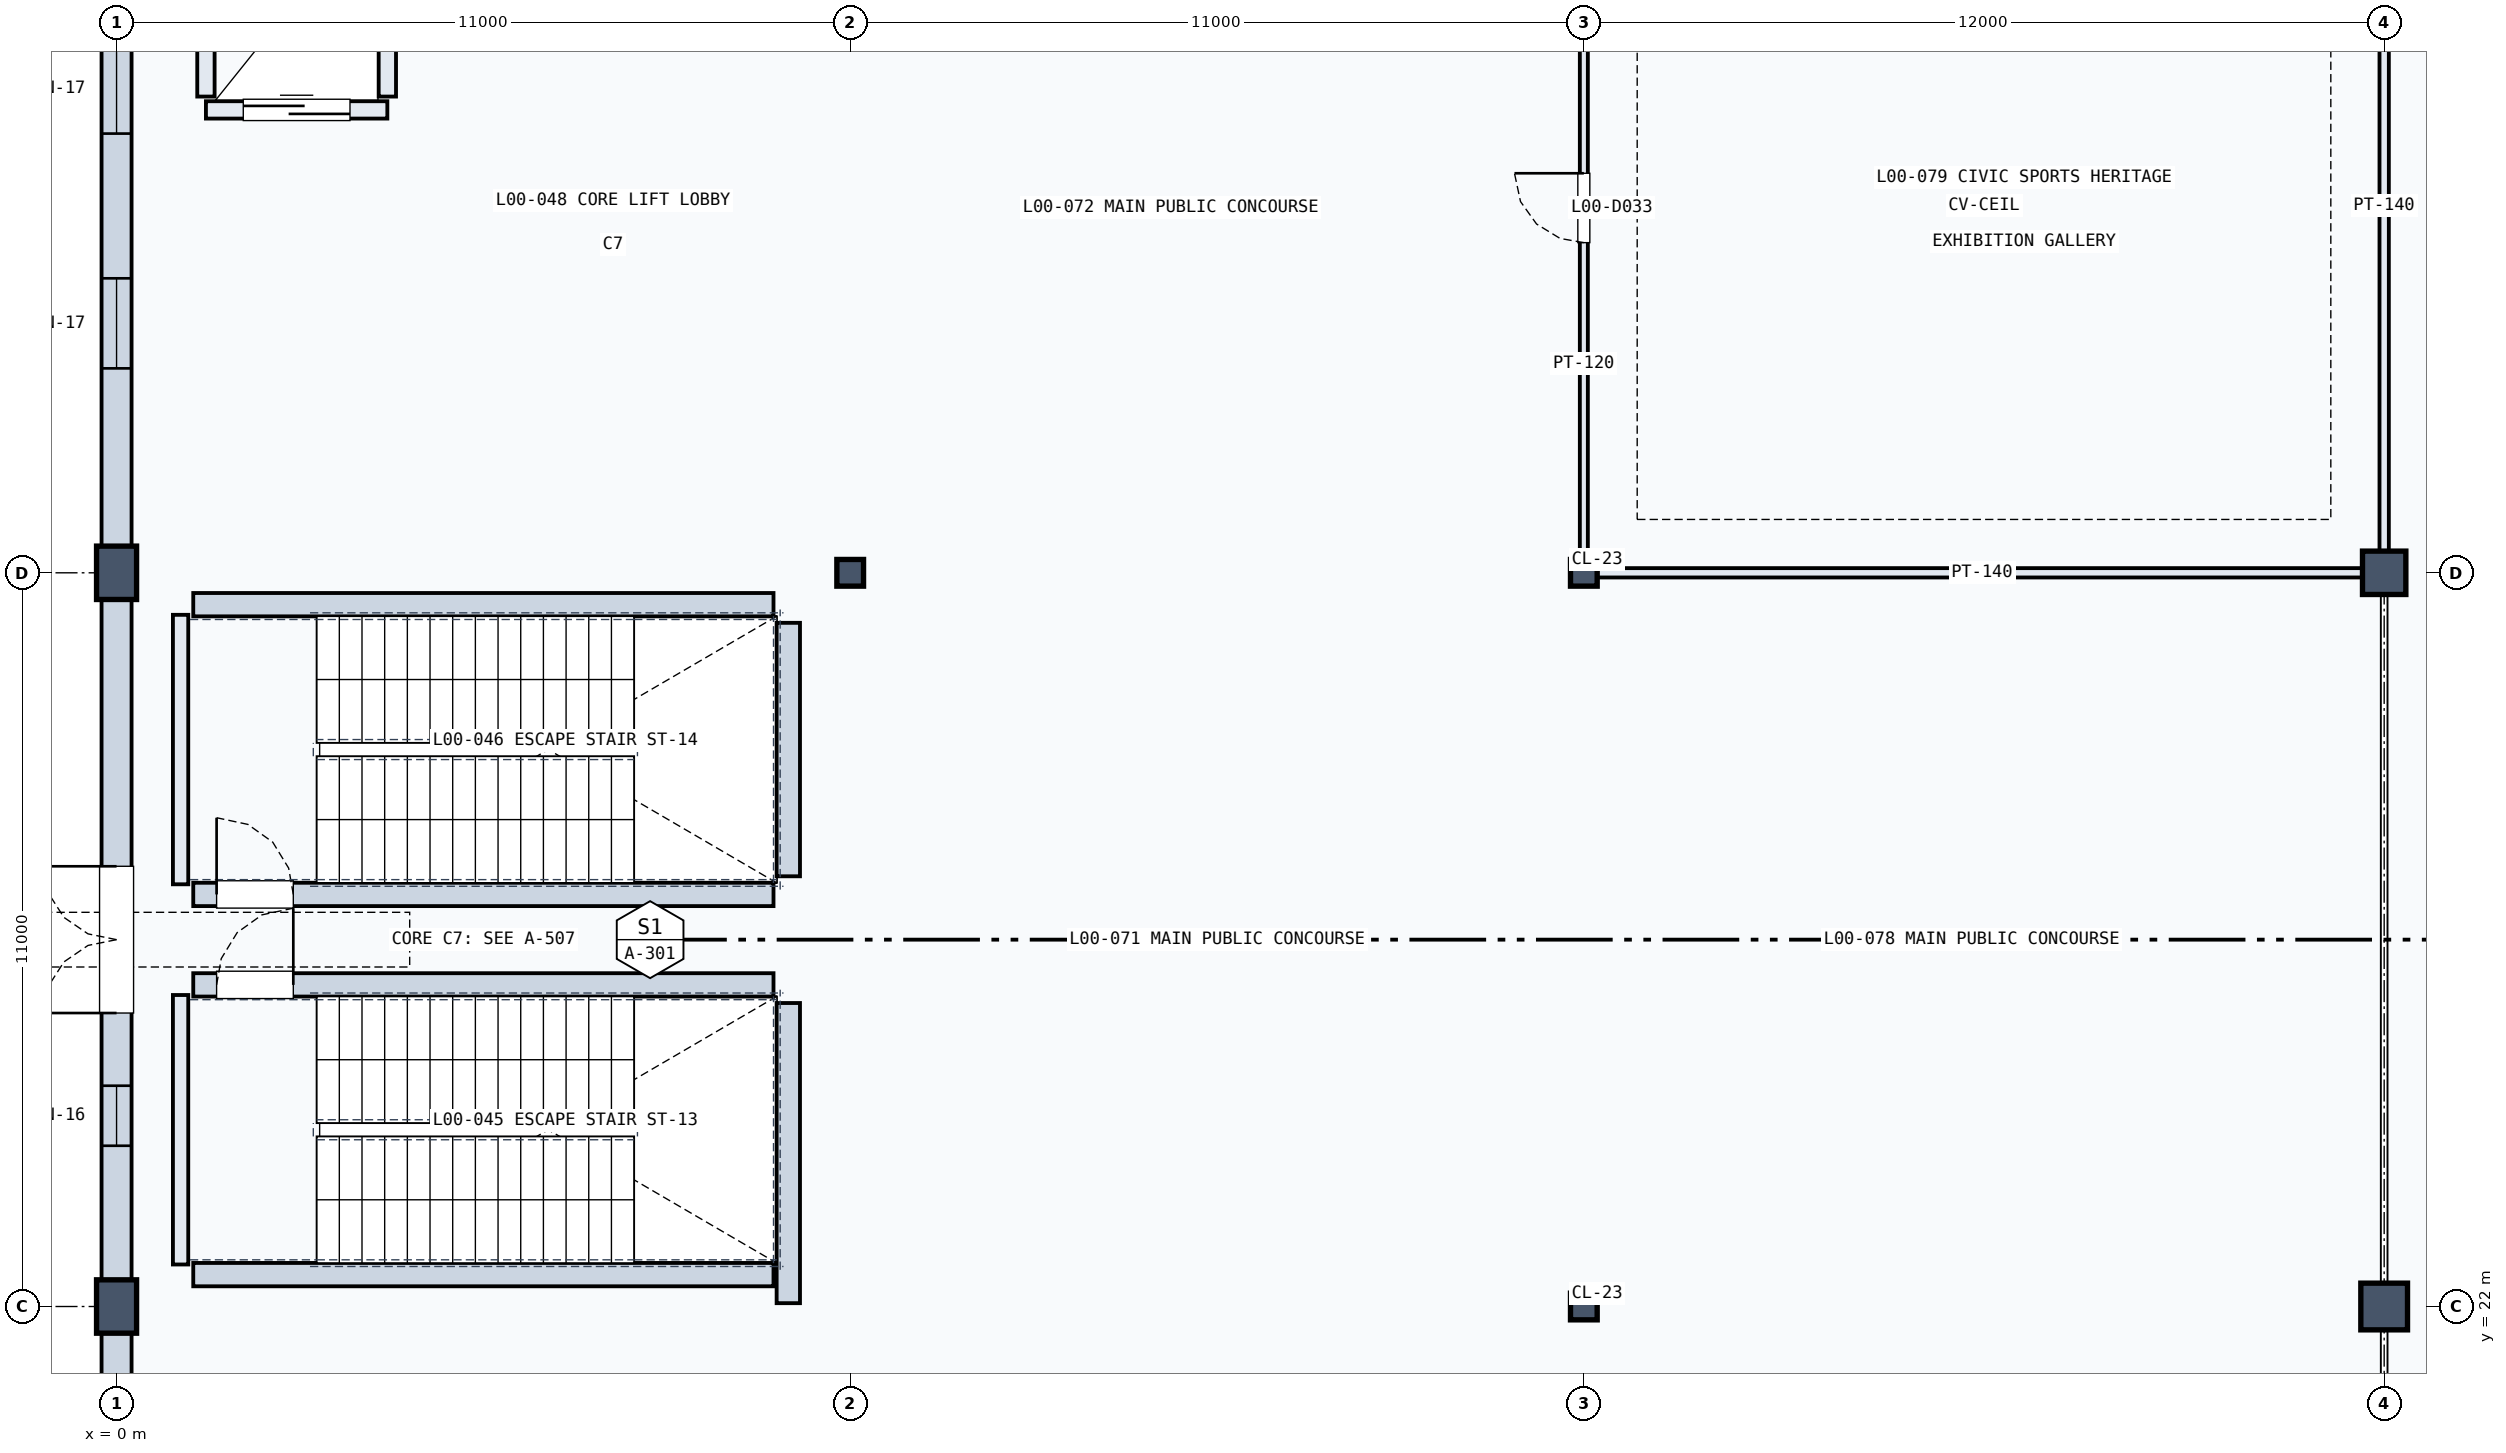
"""IFC4 building model, lengths in metres.
Left out: names, types, materials, properties, quantities, classifications, styles, units other than length and angle.
Written with IfcOpenShell. Run it as: python <this file> out.ifc"""

import sys

from ifc_helpers import new_model, si_unit, direction, frame, frame_2d, origin, origin_2d, place, context, subcontext, project, spatial, rectangle, hollow_rectangle, extrude, element, fill, save


model = new_model("IFC4")
c1 = context("Model", 3, precision=1e-05, world=origin(), true_north=direction((0.0, 1.0)))
c2 = subcontext(c1, "Body", "Model", "MODEL_VIEW")
j1 = project(units=[si_unit("LENGTHUNIT", "METRE"), si_unit("PLANEANGLEUNIT", "RADIAN")], contexts=[c1])
p1 = place(None, origin())
s1 = spatial("IfcSite", under=j1, at=p1, CompositionType="ELEMENT")
p2 = place(p1, origin())
s2 = spatial("IfcBuilding", under=s1, at=p2, CompositionType="ELEMENT")
p3 = place(p2, origin())
s3 = spatial("IfcBuildingStorey", under=s2, at=p3, CompositionType="ELEMENT", Elevation=0.0)
for number, where, z_axis, x_axis in (
    (1, (0.0, 22.0, 0.0), (0.0, 0.0, 1.0), (1.0, 0.0, 0.0)),
    (2, (0.0, 33.0, 0.0), (0.0, 0.0, 1.0), (1.0, 0.0, 0.0)),
):
    element("IfcColumn", number, at=place(p3, frame(where, z_axis=z_axis, x_axis=x_axis)), inside=s3, PredefinedType="COLUMN", context=c2, shape_type="SweptSolid", body=[
        extrude(rectangle(XDim=0.6, YDim=0.8, at=origin_2d()), origin(), (0.0, 0.0, 1.0), 5.4),
    ])
for number, where, z_axis, x_axis in (
    (3, (11.0, 33.0, 0.0), (0.0, 0.0, 1.0), (1.0, 0.0, 0.0)),
    (4, (22.0, 22.0, 0.0), (0.0, 0.0, 1.0), (1.0, 0.0, 0.0)),
    (5, (22.0, 33.0, 0.0), (0.0, 0.0, 1.0), (1.0, 0.0, 0.0)),
):
    element("IfcColumn", number, at=place(p3, frame(where, z_axis=z_axis, x_axis=x_axis)), inside=s3, PredefinedType="COLUMN", context=c2, shape_type="SweptSolid", body=[
        extrude(hollow_rectangle(XDim=0.4, YDim=0.4, WallThickness=0.02, at=origin_2d()), origin(), (0.0, 0.0, 1.0), 5.4),
    ])
p4 = place(p3, frame((34.0, 22.0, 0.0), z_axis=(0.0, 0.0, 1.0), x_axis=(1.0, 0.0, 0.0)))
e6 = element("IfcColumn", 6, at=p4, inside=s3, PredefinedType="COLUMN", context=c2, shape_type="SweptSolid", body=[
    extrude(rectangle(XDim=0.7, YDim=0.7, at=origin_2d()), origin(), (0.0, 0.0, 1.0), 5.4),
])
p5 = place(p3, frame((34.0, 33.0, 0.0), z_axis=(0.0, 0.0, 1.0), x_axis=(1.0, 0.0, 0.0)))
e7 = element("IfcColumn", 7, at=p5, inside=s3, PredefinedType="COLUMN", context=c2, shape_type="SweptSolid", body=[
    extrude(rectangle(XDim=0.65, YDim=0.65, at=origin_2d()), origin(), (0.0, 0.0, 1.0), 5.4),
])
p6 = place(p3, frame((0.0, 11.22, 0.0), z_axis=(0.0, 0.0, 1.0), x_axis=(0.0, 1.0, 0.0)))
e8 = element("IfcWall", 8, at=p6, inside=s3, PredefinedType="SOLIDWALL", context=c2, shape_type="SweptSolid", body=[
    extrude(rectangle(XDim=10.56, YDim=0.45, at=frame_2d((5.28, 0.0))), origin(), (0.0, 0.0, 1.0), 4.3),
])
p7 = place(p6, frame((2.845, 0.0, 0.8)))
e9 = element("IfcOpeningElement", 9, at=p7, cuts=e8, PredefinedType="OPENING", context=c2, shape_type="SweptSolid", body=[
    extrude(rectangle(XDim=1.35, YDim=2.1, at=frame_2d((0.675, 1.05))), frame((0.0, 0.235, 0.0), z_axis=(0.0, -1.0, 0.0), x_axis=(1.0, 0.0, 0.0)), (0.0, 0.0, 1.0), 0.47),
])
p8 = place(p6, frame((6.365, 0.0, 0.8)))
e10 = element("IfcOpeningElement", 10, at=p8, cuts=e8, PredefinedType="OPENING", context=c2, shape_type="SweptSolid", body=[
    extrude(rectangle(XDim=1.35, YDim=2.1, at=frame_2d((0.675, 1.05))), frame((0.0, 0.235, 0.0), z_axis=(0.0, -1.0, 0.0), x_axis=(1.0, 0.0, 0.0)), (0.0, 0.0, 1.0), 0.47),
])
p9 = place(p3, frame((0.0, 22.22, 0.0), z_axis=(0.0, 0.0, 1.0), x_axis=(0.0, 1.0, 0.0)))
e11 = element("IfcWall", 11, at=p9, inside=s3, PredefinedType="SOLIDWALL", context=c2, shape_type="SweptSolid", body=[
    extrude(rectangle(XDim=10.56, YDim=0.45, at=frame_2d((5.28, 0.0))), origin(), (0.0, 0.0, 1.0), 4.43),
])
p10 = place(p9, frame((4.18, 0.0, 0.0)))
e12 = element("IfcOpeningElement", 12, at=p10, cuts=e11, PredefinedType="OPENING", context=c2, shape_type="SweptSolid", body=[
    extrude(rectangle(XDim=2.2, YDim=2.35, at=frame_2d((1.1, 1.175))), frame((0.0, 0.235, 0.0), z_axis=(0.0, -1.0, 0.0), x_axis=(1.0, 0.0, 0.0)), (0.0, 0.0, 1.0), 0.47),
])
p11 = place(p9, frame((2.19, 0.0, 0.8)))
e13 = element("IfcOpeningElement", 13, at=p11, cuts=e11, PredefinedType="OPENING", context=c2, shape_type="SweptSolid", body=[
    extrude(rectangle(XDim=0.9, YDim=1.8, at=frame_2d((0.45, 0.9))), frame((0.0, 0.235, 0.0), z_axis=(0.0, -1.0, 0.0), x_axis=(1.0, 0.0, 0.0)), (0.0, 0.0, 1.0), 0.47),
])
p12 = place(p3, frame((0.0, 33.22, 0.0), z_axis=(0.0, 0.0, 1.0), x_axis=(0.0, 1.0, 0.0)))
e14 = element("IfcWall", 14, at=p12, inside=s3, PredefinedType="SOLIDWALL", context=c2, shape_type="SweptSolid", body=[
    extrude(rectangle(XDim=10.56, YDim=0.45, at=frame_2d((5.28, 0.0))), origin(), (0.0, 0.0, 1.0), 4.43),
])
p13 = place(p12, frame((2.845, 0.0, 0.8)))
e15 = element("IfcOpeningElement", 15, at=p13, cuts=e14, PredefinedType="OPENING", context=c2, shape_type="SweptSolid", body=[
    extrude(rectangle(XDim=1.35, YDim=2.1, at=frame_2d((0.675, 1.05))), frame((0.0, 0.235, 0.0), z_axis=(0.0, -1.0, 0.0), x_axis=(1.0, 0.0, 0.0)), (0.0, 0.0, 1.0), 0.47),
])
p14 = place(p12, frame((6.365, 0.0, 0.8)))
e16 = element("IfcOpeningElement", 16, at=p14, cuts=e14, PredefinedType="OPENING", context=c2, shape_type="SweptSolid", body=[
    extrude(rectangle(XDim=1.35, YDim=2.1, at=frame_2d((0.675, 1.05))), frame((0.0, 0.235, 0.0), z_axis=(0.0, -1.0, 0.0), x_axis=(1.0, 0.0, 0.0)), (0.0, 0.0, 1.0), 0.47),
])
p15 = place(p3, frame((0.96, 22.63, 0.0), z_axis=(0.0, 0.0, 1.0), x_axis=(0.0, 1.0, 0.0)))
e17 = element("IfcWall", 17, at=p15, inside=s3, PredefinedType="SOLIDWALL", context=c2, shape_type="SweptSolid", body=[
    extrude(rectangle(XDim=4.04, YDim=0.23, at=frame_2d((2.02, 0.0))), origin(), (0.0, 0.0, 1.0), 5.06),
])
p16 = place(p3, frame((10.072, 22.05, 0.0), z_axis=(0.0, 0.0, 1.0), x_axis=(0.0, 1.0, 0.0)))
e18 = element("IfcWall", 18, at=p16, inside=s3, PredefinedType="SOLIDWALL", context=c2, shape_type="SweptSolid", body=[
    extrude(rectangle(XDim=4.5, YDim=0.35, at=frame_2d((2.25, 0.0))), origin(), (0.0, 0.0, 1.0), 5.06),
])
p17 = place(p3, frame((1.15, 22.478, 0.0), z_axis=(0.0, 0.0, 1.0), x_axis=(1.0, 0.0, 0.0)))
e19 = element("IfcWall", 19, at=p17, inside=s3, PredefinedType="SOLIDWALL", context=c2, shape_type="SweptSolid", body=[
    extrude(rectangle(XDim=8.7, YDim=0.35, at=frame_2d((4.35, 0.0))), origin(), (0.0, 0.0, 1.0), 5.06),
])
p18 = place(p3, frame((1.15, 26.822, 0.0), z_axis=(0.0, 0.0, 1.0), x_axis=(1.0, 0.0, 0.0)))
e20 = element("IfcWall", 20, at=p18, inside=s3, PredefinedType="SOLIDWALL", context=c2, shape_type="SweptSolid", body=[
    extrude(rectangle(XDim=8.7, YDim=0.35, at=frame_2d((4.35, 0.0))), origin(), (0.0, 0.0, 1.0), 5.06),
])
p19 = place(p18, frame((0.35, 0.0, 0.0)))
e21 = element("IfcOpeningElement", 21, at=p19, cuts=e20, PredefinedType="OPENING", context=c2, shape_type="SweptSolid", body=[
    extrude(rectangle(XDim=1.15, YDim=2.2, at=frame_2d((0.575, 1.1))), frame((0.0, 0.185, 0.0), z_axis=(0.0, -1.0, 0.0), x_axis=(1.0, 0.0, 0.0)), (0.0, 0.0, 1.0), 0.37),
])
p20 = place(p3, frame((0.96, 28.33, 0.0), z_axis=(0.0, 0.0, 1.0), x_axis=(0.0, 1.0, 0.0)))
e22 = element("IfcWall", 22, at=p20, inside=s3, PredefinedType="SOLIDWALL", context=c2, shape_type="SweptSolid", body=[
    extrude(rectangle(XDim=4.04, YDim=0.23, at=frame_2d((2.02, 0.0))), origin(), (0.0, 0.0, 1.0), 5.06),
])
p21 = place(p3, frame((10.072, 28.45, 0.0), z_axis=(0.0, 0.0, 1.0), x_axis=(0.0, 1.0, 0.0)))
e23 = element("IfcWall", 23, at=p21, inside=s3, PredefinedType="SOLIDWALL", context=c2, shape_type="SweptSolid", body=[
    extrude(rectangle(XDim=3.8, YDim=0.35, at=frame_2d((1.9, 0.0))), origin(), (0.0, 0.0, 1.0), 5.06),
])
p22 = place(p3, frame((1.15, 28.178, 0.0), z_axis=(0.0, 0.0, 1.0), x_axis=(1.0, 0.0, 0.0)))
e24 = element("IfcWall", 24, at=p22, inside=s3, PredefinedType="SOLIDWALL", context=c2, shape_type="SweptSolid", body=[
    extrude(rectangle(XDim=8.7, YDim=0.35, at=frame_2d((4.35, 0.0))), origin(), (0.0, 0.0, 1.0), 5.06),
])
p23 = place(p22, frame((0.35, 0.0, 0.0)))
e25 = element("IfcOpeningElement", 25, at=p23, cuts=e24, PredefinedType="OPENING", context=c2, shape_type="SweptSolid", body=[
    extrude(rectangle(XDim=1.15, YDim=2.2, at=frame_2d((0.575, 1.1))), frame((0.0, 0.185, 0.0), z_axis=(0.0, -1.0, 0.0), x_axis=(1.0, 0.0, 0.0)), (0.0, 0.0, 1.0), 0.37),
])
p24 = place(p3, frame((1.15, 32.522, 0.0), z_axis=(0.0, 0.0, 1.0), x_axis=(1.0, 0.0, 0.0)))
e26 = element("IfcWall", 26, at=p24, inside=s3, PredefinedType="SOLIDWALL", context=c2, shape_type="SweptSolid", body=[
    extrude(rectangle(XDim=8.7, YDim=0.35, at=frame_2d((4.35, 0.0))), origin(), (0.0, 0.0, 1.0), 5.06),
])
p25 = place(p3, frame((1.34, 39.94, 0.0), z_axis=(0.0, 0.0, 1.0), x_axis=(1.0, 0.0, 0.0)))
e27 = element("IfcWall", 27, at=p25, inside=s3, PredefinedType="SOLIDWALL", context=c2, shape_type="SweptSolid", body=[
    extrude(rectangle(XDim=2.72, YDim=0.26, at=frame_2d((1.36, 0.0))), origin(), (0.0, 0.0, 1.0), 5.06),
])
p26 = place(p25, frame((0.56, 0.0, 0.0)))
e28 = element("IfcOpeningElement", 28, at=p26, cuts=e27, PredefinedType="OPENING", context=c2, shape_type="SweptSolid", body=[
    extrude(rectangle(XDim=1.6, YDim=2.35, at=frame_2d((0.8, 1.175))), frame((0.0, 0.14, 0.0), z_axis=(0.0, -1.0, 0.0), x_axis=(1.0, 0.0, 0.0)), (0.0, 0.0, 1.0), 0.28),
])
for number, where, z_axis, x_axis in (
    (29, (1.34, 40.14, 0.0), (0.0, 0.0, 1.0), (0.0, 1.0, 0.0)),
    (30, (4.06, 40.14, 0.0), (0.0, 0.0, 1.0), (0.0, 1.0, 0.0)),
):
    element("IfcWall", number, at=place(p3, frame(where, z_axis=z_axis, x_axis=x_axis)), inside=s3, PredefinedType="SOLIDWALL", context=c2, shape_type="SweptSolid", body=[
        extrude(rectangle(XDim=2.92, YDim=0.26, at=frame_2d((1.46, 0.0))), origin(), (0.0, 0.0, 1.0), 5.06),
    ])
p27 = place(p3, frame((22.0, 33.16, 0.0), z_axis=(0.0, 0.0, 1.0), x_axis=(0.0, 1.0, 0.0)))
e31 = element("IfcWall", 31, at=p27, inside=s3, PredefinedType="PARTITIONING", context=c2, shape_type="SweptSolid", body=[
    extrude(rectangle(XDim=10.62, YDim=0.12, at=frame_2d((5.31, 0.0))), origin(), (0.0, 0.0, 1.0), 4.438),
])
p28 = place(p27, frame((4.79, 0.0, 0.0)))
e32 = element("IfcOpeningElement", 32, at=p28, cuts=e31, PredefinedType="OPENING", context=c2, shape_type="SweptSolid", body=[
    extrude(rectangle(XDim=1.04, YDim=2.2, at=frame_2d((0.52, 1.1))), frame((0.0, 0.07, 0.0), z_axis=(0.0, -1.0, 0.0), x_axis=(1.0, 0.0, 0.0)), (0.0, 0.0, 1.0), 0.14),
])
p29 = place(p3, frame((22.16, 33.0, 0.0), z_axis=(0.0, 0.0, 1.0), x_axis=(1.0, 0.0, 0.0)))
e33 = element("IfcWall", 33, at=p29, inside=s3, PredefinedType="PARTITIONING", context=c2, shape_type="SweptSolid", body=[
    extrude(rectangle(XDim=11.62, YDim=0.14, at=frame_2d((5.81, 0.0))), origin(), (0.0, 0.0, 1.0), 4.1),
])
p30 = place(p3, frame((34.0, 33.22, 0.0), z_axis=(0.0, 0.0, 1.0), x_axis=(0.0, 1.0, 0.0)))
e34 = element("IfcWall", 34, at=p30, inside=s3, PredefinedType="PARTITIONING", context=c2, shape_type="SweptSolid", body=[
    extrude(rectangle(XDim=10.56, YDim=0.14, at=frame_2d((5.28, 0.0))), origin(), (0.0, 0.0, 1.0), 4.1),
])
p31 = place(p10, origin())
e35 = element("IfcDoor", 35, at=p31, inside=s3, OperationType="DOUBLE_DOOR_SINGLE_SWING", PredefinedType="DOOR", context=c2, shape_type="SweptSolid", body=[
    extrude(rectangle(XDim=2.2, YDim=2.35, at=frame_2d((1.1, 1.175))), frame((0.0, 0.025, 0.0), z_axis=(0.0, -1.0, 0.0), x_axis=(1.0, 0.0, 0.0)), (0.0, 0.0, 1.0), 0.05),
])
fill(e12, e35)
p32 = place(p11, origin())
e36 = element("IfcWindow", 36, at=p32, inside=s3, PartitioningType="SINGLE_PANEL", PredefinedType="WINDOW", context=c2, shape_type="SweptSolid", body=[
    extrude(rectangle(XDim=0.9, YDim=1.8, at=frame_2d((0.45, 0.9))), frame((0.0, 0.03, 0.0), z_axis=(0.0, -1.0, 0.0), x_axis=(1.0, 0.0, 0.0)), (0.0, 0.0, 1.0), 0.06),
])
fill(e13, e36)
p33 = place(p13, origin())
e37 = element("IfcWindow", 37, at=p33, inside=s3, PartitioningType="SINGLE_PANEL", PredefinedType="WINDOW", context=c2, shape_type="SweptSolid", body=[
    extrude(rectangle(XDim=1.35, YDim=2.1, at=frame_2d((0.675, 1.05))), frame((0.0, 0.03, 0.0), z_axis=(0.0, -1.0, 0.0), x_axis=(1.0, 0.0, 0.0)), (0.0, 0.0, 1.0), 0.06),
])
fill(e15, e37)
p34 = place(p14, origin())
e38 = element("IfcWindow", 38, at=p34, inside=s3, PartitioningType="SINGLE_PANEL", PredefinedType="WINDOW", context=c2, shape_type="SweptSolid", body=[
    extrude(rectangle(XDim=1.35, YDim=2.1, at=frame_2d((0.675, 1.05))), frame((0.0, 0.03, 0.0), z_axis=(0.0, -1.0, 0.0), x_axis=(1.0, 0.0, 0.0)), (0.0, 0.0, 1.0), 0.06),
])
fill(e16, e38)
p35 = place(p19, origin())
e39 = element("IfcDoor", 39, at=p35, inside=s3, OperationType="SINGLE_SWING_RIGHT", PredefinedType="DOOR", context=c2, shape_type="SweptSolid", body=[
    extrude(rectangle(XDim=1.15, YDim=2.2, at=frame_2d((0.575, 1.1))), frame((0.0, 0.025, 0.0), z_axis=(0.0, -1.0, 0.0), x_axis=(1.0, 0.0, 0.0)), (0.0, 0.0, 1.0), 0.05),
])
fill(e21, e39)
p36 = place(p23, origin())
e40 = element("IfcDoor", 40, at=p36, inside=s3, OperationType="SINGLE_SWING_LEFT", PredefinedType="DOOR", context=c2, shape_type="SweptSolid", body=[
    extrude(rectangle(XDim=1.15, YDim=2.2, at=frame_2d((0.575, 1.1))), frame((0.0, 0.025, 0.0), z_axis=(0.0, -1.0, 0.0), x_axis=(1.0, 0.0, 0.0)), (0.0, 0.0, 1.0), 0.05),
])
fill(e25, e40)
p37 = place(p26, origin())
e41 = element("IfcDoor", 41, at=p37, inside=s3, OperationType="DOUBLE_DOOR_SLIDING", PredefinedType="DOOR", context=c2, shape_type="SweptSolid", body=[
    extrude(rectangle(XDim=1.6, YDim=2.35, at=frame_2d((0.8, 1.175))), frame((0.0, 0.025, 0.0), z_axis=(0.0, -1.0, 0.0), x_axis=(1.0, 0.0, 0.0)), (0.0, 0.0, 1.0), 0.05),
])
fill(e28, e41)
p38 = place(p28, origin())
e42 = element("IfcDoor", 42, at=p38, inside=s3, OperationType="SINGLE_SWING_RIGHT", PredefinedType="DOOR", context=c2, shape_type="SweptSolid", body=[
    extrude(rectangle(XDim=1.04, YDim=2.2, at=frame_2d((0.52, 1.1))), frame((0.0, 0.025, 0.0), z_axis=(0.0, -1.0, 0.0), x_axis=(1.0, 0.0, 0.0)), (0.0, 0.0, 1.0), 0.05),
])
fill(e32, e42)
save(model, sys.argv[1])
